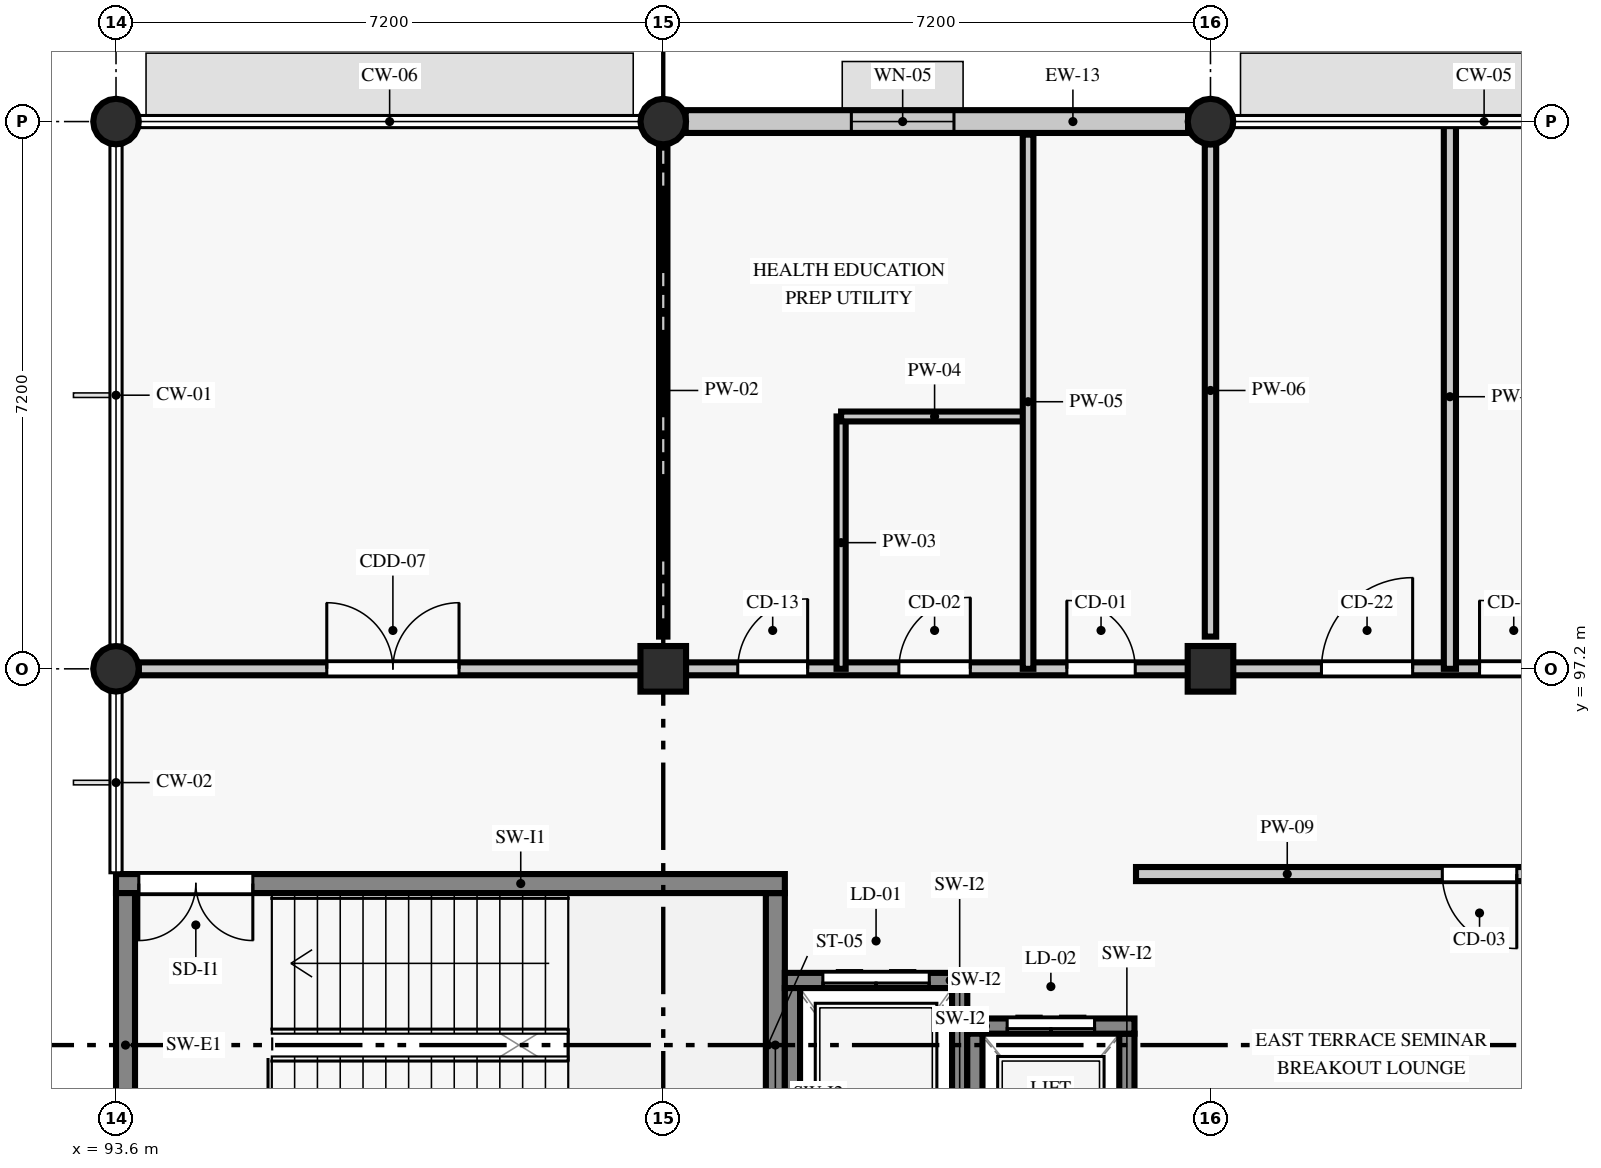
"""IFC4 building model, lengths in metres.
Left out: names, types, materials, properties, quantities, classifications, styles, units other than length and angle.
Written with IfcOpenShell. Run it as: python <this file> out.ifc"""

import sys

from ifc_helpers import new_model, si_unit, direction, frame, frame_2d, origin, origin_2d, place, context, subcontext, project, spatial, rectangle, circle, extrude, element, fill, save


model = new_model("IFC4")
c1 = context("Model", 3, precision=1e-05, world=origin(), true_north=direction((0.0, 1.0)))
c2 = subcontext(c1, "Body", "Model", "MODEL_VIEW")
j1 = project(units=[si_unit("LENGTHUNIT", "METRE"), si_unit("PLANEANGLEUNIT", "RADIAN")], contexts=[c1])
p1 = place(None, origin())
s1 = spatial("IfcSite", under=j1, at=p1, CompositionType="ELEMENT")
p2 = place(p1, origin())
s2 = spatial("IfcBuilding", under=s1, at=p2, CompositionType="ELEMENT")
p3 = place(p2, frame((0.0, 0.0, 13.8)))
s3 = spatial("IfcBuildingStorey", under=s2, at=p3, CompositionType="ELEMENT", Elevation=13.8)
for number, where, z_axis, x_axis in (
    (1, (93.6, 97.2, 0.0), (0.0, 0.0, 1.0), (1.0, 0.0, 0.0)),
    (2, (93.6, 104.4, 0.0), (0.0, 0.0, 1.0), (1.0, 0.0, 0.0)),
):
    element("IfcColumn", number, at=place(p3, frame(where, z_axis=z_axis, x_axis=x_axis)), inside=s3, PredefinedType="COLUMN", context=c2, shape_type="SweptSolid", body=[
        extrude(circle(Radius=0.3, at=origin_2d()), origin(), (0.0, 0.0, 1.0), 3.92),
    ])
p4 = place(p3, frame((100.8, 97.2, 0.0), z_axis=(0.0, 0.0, 1.0), x_axis=(1.0, 0.0, 0.0)))
e3 = element("IfcColumn", 3, at=p4, inside=s3, PredefinedType="COLUMN", context=c2, shape_type="SweptSolid", body=[
    extrude(rectangle(XDim=0.6, YDim=0.6, at=origin_2d()), origin(), (0.0, 0.0, 1.0), 3.92),
])
p5 = place(p3, frame((100.8, 104.4, 0.0), z_axis=(0.0, 0.0, 1.0), x_axis=(1.0, 0.0, 0.0)))
e4 = element("IfcColumn", 4, at=p5, inside=s3, PredefinedType="COLUMN", context=c2, shape_type="SweptSolid", body=[
    extrude(circle(Radius=0.3, at=origin_2d()), origin(), (0.0, 0.0, 1.0), 3.92),
])
p6 = place(p3, frame((108.0, 97.2, 0.0), z_axis=(0.0, 0.0, 1.0), x_axis=(1.0, 0.0, 0.0)))
e5 = element("IfcColumn", 5, at=p6, inside=s3, PredefinedType="COLUMN", context=c2, shape_type="SweptSolid", body=[
    extrude(rectangle(XDim=0.6, YDim=0.6, at=origin_2d()), origin(), (0.0, 0.0, 1.0), 3.92),
])
p7 = place(p3, frame((108.0, 104.4, 0.0), z_axis=(0.0, 0.0, 1.0), x_axis=(1.0, 0.0, 0.0)))
e6 = element("IfcColumn", 6, at=p7, inside=s3, PredefinedType="COLUMN", context=c2, shape_type="SweptSolid", body=[
    extrude(circle(Radius=0.3, at=origin_2d()), origin(), (0.0, 0.0, 1.0), 3.92),
])
p8 = place(p3, frame((107.705, 104.4, 0.0), z_axis=(0.0, 0.0, 1.0), x_axis=(-1.0, 0.0, 0.0)))
e7 = element("IfcWall", 7, at=p8, inside=s3, PredefinedType="STANDARD", context=c2, shape_type="SweptSolid", body=[
    extrude(rectangle(XDim=6.61, YDim=0.3, at=frame_2d((3.305, 0.0))), origin(), (0.0, 0.0, 1.0), 3.27),
])
p9 = place(p8, frame((3.08, 0.0, 0.9)))
e8 = element("IfcOpeningElement", 8, at=p9, cuts=e7, PredefinedType="OPENING", context=c2, shape_type="SweptSolid", body=[
    extrude(rectangle(XDim=1.35, YDim=1.3, at=frame_2d((0.675, 0.65))), frame((0.0, 0.16, 0.0), z_axis=(0.0, -1.0, 0.0), x_axis=(1.0, 0.0, 0.0)), (0.0, 0.0, 1.0), 0.32),
])
p10 = place(p3, frame((102.275, 90.25, 0.0), z_axis=(0.0, 0.0, 1.0), x_axis=(0.0, 1.0, 0.0)))
e9 = element("IfcWall", 9, at=p10, inside=s3, PredefinedType="SHEAR", context=c2, shape_type="SweptSolid", body=[
    extrude(rectangle(XDim=4.0, YDim=0.25, at=frame_2d((2.0, 0.0))), origin(), (0.0, 0.0, 1.0), 3.92),
])
p11 = place(p3, frame((102.4, 94.375, 0.0), z_axis=(0.0, 0.0, 1.0), x_axis=(-1.0, 0.0, 0.0)))
e10 = element("IfcWall", 10, at=p11, inside=s3, PredefinedType="SHEAR", context=c2, shape_type="SweptSolid", body=[
    extrude(rectangle(XDim=8.8, YDim=0.25, at=frame_2d((4.4, 0.0))), origin(), (0.0, 0.0, 1.0), 3.92),
])
p12 = place(p11, frame((7.0, 0.0, 0.0)))
e11 = element("IfcOpeningElement", 11, at=p12, cuts=e10, PredefinedType="OPENING", context=c2, shape_type="SweptSolid", body=[
    extrude(rectangle(XDim=1.5, YDim=2.15, at=frame_2d((0.75, 1.075))), frame((0.0, 0.135, 0.0), z_axis=(0.0, -1.0, 0.0), x_axis=(1.0, 0.0, 0.0)), (0.0, 0.0, 1.0), 0.27),
])
p13 = place(p3, frame((93.725, 94.25, 0.0), z_axis=(0.0, 0.0, 1.0), x_axis=(0.0, -1.0, 0.0)))
e12 = element("IfcWall", 12, at=p13, inside=s3, PredefinedType="SHEAR", context=c2, shape_type="SweptSolid", body=[
    extrude(rectangle(XDim=4.0, YDim=0.25, at=frame_2d((2.0, 0.0))), origin(), (0.0, 0.0, 1.0), 3.92),
])
p14 = place(p3, frame((104.7, 90.2, 0.0), z_axis=(0.0, 0.0, 1.0), x_axis=(0.0, 1.0, 0.0)))
e13 = element("IfcWall", 13, at=p14, inside=s3, PredefinedType="SHEAR", context=c2, shape_type="SweptSolid", body=[
    extrude(rectangle(XDim=2.8, YDim=0.2, at=frame_2d((1.4, 0.0))), origin(), (0.0, 0.0, 1.0), 3.92),
])
p15 = place(p3, frame((104.8, 93.1, 0.0), z_axis=(0.0, 0.0, 1.0), x_axis=(-1.0, 0.0, 0.0)))
e14 = element("IfcWall", 14, at=p15, inside=s3, PredefinedType="SHEAR", context=c2, shape_type="SweptSolid", body=[
    extrude(rectangle(XDim=2.4, YDim=0.2, at=frame_2d((1.2, 0.0))), origin(), (0.0, 0.0, 1.0), 3.92),
])
p16 = place(p15, frame((0.5, 0.0, 0.0)))
e15 = element("IfcOpeningElement", 15, at=p16, cuts=e14, PredefinedType="OPENING", context=c2, shape_type="SweptSolid", body=[
    extrude(rectangle(XDim=1.4, YDim=2.15, at=frame_2d((0.7, 1.075))), frame((0.0, 0.11, 0.0), z_axis=(0.0, -1.0, 0.0), x_axis=(1.0, 0.0, 0.0)), (0.0, 0.0, 1.0), 0.22),
])
p17 = place(p3, frame((102.5, 93.0, 0.0), z_axis=(0.0, 0.0, 1.0), x_axis=(0.0, -1.0, 0.0)))
e16 = element("IfcWall", 16, at=p17, inside=s3, PredefinedType="SHEAR", context=c2, shape_type="SweptSolid", body=[
    extrude(rectangle(XDim=2.8, YDim=0.2, at=frame_2d((1.4, 0.0))), origin(), (0.0, 0.0, 1.0), 3.92),
])
p18 = place(p3, frame((106.9, 90.2, 0.0), z_axis=(0.0, 0.0, 1.0), x_axis=(0.0, 1.0, 0.0)))
e17 = element("IfcWall", 17, at=p18, inside=s3, PredefinedType="SHEAR", context=c2, shape_type="SweptSolid", body=[
    extrude(rectangle(XDim=2.2, YDim=0.2, at=frame_2d((1.1, 0.0))), origin(), (0.0, 0.0, 1.0), 3.92),
])
p19 = place(p3, frame((107.0, 92.5, 0.0), z_axis=(0.0, 0.0, 1.0), x_axis=(-1.0, 0.0, 0.0)))
e18 = element("IfcWall", 18, at=p19, inside=s3, PredefinedType="SHEAR", context=c2, shape_type="SweptSolid", body=[
    extrude(rectangle(XDim=2.2, YDim=0.2, at=frame_2d((1.1, 0.0))), origin(), (0.0, 0.0, 1.0), 3.92),
])
p20 = place(p19, frame((0.525, 0.0, 0.0)))
e19 = element("IfcOpeningElement", 19, at=p20, cuts=e18, PredefinedType="OPENING", context=c2, shape_type="SweptSolid", body=[
    extrude(rectangle(XDim=1.15, YDim=2.15, at=frame_2d((0.575, 1.075))), frame((0.0, 0.11, 0.0), z_axis=(0.0, -1.0, 0.0), x_axis=(1.0, 0.0, 0.0)), (0.0, 0.0, 1.0), 0.22),
])
p21 = place(p3, frame((104.9, 92.4, 0.0), z_axis=(0.0, 0.0, 1.0), x_axis=(0.0, -1.0, 0.0)))
e20 = element("IfcWall", 20, at=p21, inside=s3, PredefinedType="SHEAR", context=c2, shape_type="SweptSolid", body=[
    extrude(rectangle(XDim=2.2, YDim=0.2, at=frame_2d((1.1, 0.0))), origin(), (0.0, 0.0, 1.0), 3.92),
])
p22 = place(p3, frame((93.9, 97.2, 0.0), z_axis=(0.0, 0.0, 1.0), x_axis=(1.0, 0.0, 0.0)))
e21 = element("IfcWall", 21, at=p22, inside=s3, PredefinedType="PARTITIONING", context=c2, shape_type="SweptSolid", body=[
    extrude(rectangle(XDim=28.2, YDim=0.17, at=frame_2d((14.1, 0.0))), origin(), (0.0, 0.0, 1.0), 3.17),
])
p23 = place(p22, frame((2.473, 0.0, 0.0)))
e22 = element("IfcOpeningElement", 22, at=p23, cuts=e21, PredefinedType="OPENING", context=c2, shape_type="SweptSolid", body=[
    extrude(rectangle(XDim=1.74, YDim=2.26, at=frame_2d((0.87, 1.13))), frame((0.0, 0.095, 0.0), z_axis=(0.0, -1.0, 0.0), x_axis=(1.0, 0.0, 0.0)), (0.0, 0.0, 1.0), 0.19),
])
p24 = place(p22, frame((7.88, 0.0, 0.0)))
e23 = element("IfcOpeningElement", 23, at=p24, cuts=e21, PredefinedType="OPENING", context=c2, shape_type="SweptSolid", body=[
    extrude(rectangle(XDim=0.92, YDim=2.18, at=frame_2d((0.46, 1.09))), frame((0.0, 0.095, 0.0), z_axis=(0.0, -1.0, 0.0), x_axis=(1.0, 0.0, 0.0)), (0.0, 0.0, 1.0), 0.19),
])
p25 = place(p22, frame((10.0, 0.0, 0.0)))
e24 = element("IfcOpeningElement", 24, at=p25, cuts=e21, PredefinedType="OPENING", context=c2, shape_type="SweptSolid", body=[
    extrude(rectangle(XDim=0.94, YDim=2.08, at=frame_2d((0.47, 1.04))), frame((0.0, 0.095, 0.0), z_axis=(0.0, -1.0, 0.0), x_axis=(1.0, 0.0, 0.0)), (0.0, 0.0, 1.0), 0.19),
])
p26 = place(p22, frame((12.21, 0.0, 0.0)))
e25 = element("IfcOpeningElement", 25, at=p26, cuts=e21, PredefinedType="OPENING", context=c2, shape_type="SweptSolid", body=[
    extrude(rectangle(XDim=0.9, YDim=2.08, at=frame_2d((0.45, 1.04))), frame((0.0, 0.095, 0.0), z_axis=(0.0, -1.0, 0.0), x_axis=(1.0, 0.0, 0.0)), (0.0, 0.0, 1.0), 0.19),
])
p27 = place(p22, frame((15.56, 0.0, 0.0)))
e26 = element("IfcOpeningElement", 26, at=p27, cuts=e21, PredefinedType="OPENING", context=c2, shape_type="SweptSolid", body=[
    extrude(rectangle(XDim=1.2, YDim=2.23, at=frame_2d((0.6, 1.115))), frame((0.0, 0.095, 0.0), z_axis=(0.0, -1.0, 0.0), x_axis=(1.0, 0.0, 0.0)), (0.0, 0.0, 1.0), 0.19),
])
p28 = place(p22, frame((17.64, 0.0, 0.0)))
e27 = element("IfcOpeningElement", 27, at=p28, cuts=e21, PredefinedType="OPENING", context=c2, shape_type="SweptSolid", body=[
    extrude(rectangle(XDim=0.9, YDim=2.08, at=frame_2d((0.45, 1.04))), frame((0.0, 0.095, 0.0), z_axis=(0.0, -1.0, 0.0), x_axis=(1.0, 0.0, 0.0)), (0.0, 0.0, 1.0), 0.19),
])
p29 = place(p22, frame((24.254, 0.0, 0.0)))
e28 = element("IfcOpeningElement", 28, at=p29, cuts=e21, PredefinedType="OPENING", context=c2, shape_type="SweptSolid", body=[
    extrude(rectangle(XDim=0.94, YDim=2.08, at=frame_2d((0.47, 1.04))), frame((0.0, 0.095, 0.0), z_axis=(0.0, -1.0, 0.0), x_axis=(1.0, 0.0, 0.0)), (0.0, 0.0, 1.0), 0.19),
])
p30 = place(p3, frame((100.8, 97.624, 0.0), z_axis=(0.0, 0.0, 1.0), x_axis=(0.0, 1.0, 0.0)))
e29 = element("IfcWall", 29, at=p30, inside=s3, PredefinedType="PARTITIONING", context=c2, shape_type="SweptSolid", body=[
    extrude(rectangle(XDim=6.476, YDim=0.11, at=frame_2d((3.238, 0.0))), origin(), (0.0, 0.0, 1.0), 3.37),
])
p31 = place(p3, frame((103.14, 97.2, 0.0), z_axis=(0.0, 0.0, 1.0), x_axis=(0.0, 1.0, 0.0)))
e30 = element("IfcWall", 30, at=p31, inside=s3, PredefinedType="PARTITIONING", context=c2, shape_type="SweptSolid", body=[
    extrude(rectangle(XDim=3.32, YDim=0.12, at=frame_2d((1.66, 0.0))), origin(), (0.0, 0.0, 1.0), 3.17),
])
p32 = place(p3, frame((103.14, 100.52, 0.0), z_axis=(0.0, 0.0, 1.0), x_axis=(1.0, 0.0, 0.0)))
e31 = element("IfcWall", 31, at=p32, inside=s3, PredefinedType="PARTITIONING", context=c2, shape_type="SweptSolid", body=[
    extrude(rectangle(XDim=2.46, YDim=0.13, at=frame_2d((1.23, 0.0))), origin(), (0.0, 0.0, 1.0), 3.92),
])
p33 = place(p3, frame((105.6, 97.2, 0.0), z_axis=(0.0, 0.0, 1.0), x_axis=(0.0, 1.0, 0.0)))
e32 = element("IfcWall", 32, at=p33, inside=s3, PredefinedType="PARTITIONING", context=c2, shape_type="SweptSolid", body=[
    extrude(rectangle(XDim=7.028, YDim=0.14, at=frame_2d((3.514, 0.0))), origin(), (0.0, 0.0, 1.0), 3.17),
])
p34 = place(p3, frame((108.0, 97.624, 0.0), z_axis=(0.0, 0.0, 1.0), x_axis=(0.0, 1.0, 0.0)))
e33 = element("IfcWall", 33, at=p34, inside=s3, PredefinedType="PARTITIONING", context=c2, shape_type="SweptSolid", body=[
    extrude(rectangle(XDim=6.476, YDim=0.15, at=frame_2d((3.238, 0.0))), origin(), (0.0, 0.0, 1.0), 3.37),
])
p35 = place(p3, frame((111.15, 97.2, 0.0), z_axis=(0.0, 0.0, 1.0), x_axis=(0.0, 1.0, 0.0)))
e34 = element("IfcWall", 34, at=p35, inside=s3, PredefinedType="PARTITIONING", context=c2, shape_type="SweptSolid", body=[
    extrude(rectangle(XDim=7.16, YDim=0.16, at=frame_2d((3.58, 0.0))), origin(), (0.0, 0.0, 1.0), 3.17),
])
p36 = place(p3, frame((107.02, 94.5, 0.0), z_axis=(0.0, 0.0, 1.0), x_axis=(1.0, 0.0, 0.0)))
e35 = element("IfcWall", 35, at=p36, inside=s3, PredefinedType="PARTITIONING", context=c2, shape_type="SweptSolid", body=[
    extrude(rectangle(XDim=6.56, YDim=0.185, at=frame_2d((3.28, 0.0))), origin(), (0.0, 0.0, 1.0), 3.37),
])
p37 = place(p36, frame((4.03, 0.0, 0.0)))
e36 = element("IfcOpeningElement", 36, at=p37, cuts=e35, PredefinedType="OPENING", context=c2, shape_type="SweptSolid", body=[
    extrude(rectangle(XDim=0.98, YDim=2.08, at=frame_2d((0.49, 1.04))), frame((0.0, 0.103, 0.0), z_axis=(0.0, -1.0, 0.0), x_axis=(1.0, 0.0, 0.0)), (0.0, 0.0, 1.0), 0.205),
])
p38 = place(p9, origin())
e37 = element("IfcWindow", 37, at=p38, inside=s3, PartitioningType="SINGLE_PANEL", PredefinedType="WINDOW", context=c2, shape_type="SweptSolid", body=[
    extrude(rectangle(XDim=1.35, YDim=1.3, at=frame_2d((0.675, 0.65))), frame((0.0, 0.03, 0.0), z_axis=(0.0, -1.0, 0.0), x_axis=(1.0, 0.0, 0.0)), (0.0, 0.0, 1.0), 0.06),
])
fill(e8, e37)
p39 = place(p12, origin())
e38 = element("IfcDoor", 38, at=p39, inside=s3, OperationType="DOUBLE_DOOR_SINGLE_SWING", PredefinedType="DOOR", context=c2, shape_type="SweptSolid", body=[
    extrude(rectangle(XDim=1.5, YDim=2.15, at=frame_2d((0.75, 1.075))), frame((0.0, 0.025, 0.0), z_axis=(0.0, -1.0, 0.0), x_axis=(1.0, 0.0, 0.0)), (0.0, 0.0, 1.0), 0.05),
])
fill(e11, e38)
p40 = place(p16, frame((1.4, 0.0, 0.0), z_axis=(0.0, 0.0, 1.0), x_axis=(-1.0, 0.0, 0.0)))
e39 = element("IfcDoor", 39, at=p40, inside=s3, OperationType="DOUBLE_DOOR_SLIDING", PredefinedType="DOOR", context=c2, shape_type="SweptSolid", body=[
    extrude(rectangle(XDim=1.4, YDim=2.15, at=frame_2d((0.7, 1.075))), frame((0.0, 0.025, 0.0), z_axis=(0.0, -1.0, 0.0), x_axis=(1.0, 0.0, 0.0)), (0.0, 0.0, 1.0), 0.05),
])
fill(e15, e39)
p41 = place(p20, frame((1.15, 0.0, 0.0), z_axis=(0.0, 0.0, 1.0), x_axis=(-1.0, 0.0, 0.0)))
e40 = element("IfcDoor", 40, at=p41, inside=s3, OperationType="DOUBLE_DOOR_SLIDING", PredefinedType="DOOR", context=c2, shape_type="SweptSolid", body=[
    extrude(rectangle(XDim=1.15, YDim=2.15, at=frame_2d((0.575, 1.075))), frame((0.0, 0.025, 0.0), z_axis=(0.0, -1.0, 0.0), x_axis=(1.0, 0.0, 0.0)), (0.0, 0.0, 1.0), 0.05),
])
fill(e19, e40)
p42 = place(p23, origin())
e41 = element("IfcDoor", 41, at=p42, inside=s3, OperationType="DOUBLE_DOOR_SINGLE_SWING", PredefinedType="DOOR", context=c2, shape_type="SweptSolid", body=[
    extrude(rectangle(XDim=1.74, YDim=2.26, at=frame_2d((0.87, 1.13))), frame((0.0, 0.025, 0.0), z_axis=(0.0, -1.0, 0.0), x_axis=(1.0, 0.0, 0.0)), (0.0, 0.0, 1.0), 0.05),
])
fill(e22, e41)
p43 = place(p24, origin())
e42 = element("IfcDoor", 42, at=p43, inside=s3, OperationType="SINGLE_SWING_RIGHT", PredefinedType="DOOR", context=c2, shape_type="SweptSolid", body=[
    extrude(rectangle(XDim=0.92, YDim=2.18, at=frame_2d((0.46, 1.09))), frame((0.0, 0.025, 0.0), z_axis=(0.0, -1.0, 0.0), x_axis=(1.0, 0.0, 0.0)), (0.0, 0.0, 1.0), 0.05),
])
fill(e23, e42)
p44 = place(p25, origin())
e43 = element("IfcDoor", 43, at=p44, inside=s3, OperationType="SINGLE_SWING_RIGHT", PredefinedType="DOOR", context=c2, shape_type="SweptSolid", body=[
    extrude(rectangle(XDim=0.94, YDim=2.08, at=frame_2d((0.47, 1.04))), frame((0.0, 0.025, 0.0), z_axis=(0.0, -1.0, 0.0), x_axis=(1.0, 0.0, 0.0)), (0.0, 0.0, 1.0), 0.05),
])
fill(e24, e43)
p45 = place(p26, origin())
e44 = element("IfcDoor", 44, at=p45, inside=s3, OperationType="SINGLE_SWING_LEFT", PredefinedType="DOOR", context=c2, shape_type="SweptSolid", body=[
    extrude(rectangle(XDim=0.9, YDim=2.08, at=frame_2d((0.45, 1.04))), frame((0.0, 0.025, 0.0), z_axis=(0.0, -1.0, 0.0), x_axis=(1.0, 0.0, 0.0)), (0.0, 0.0, 1.0), 0.05),
])
fill(e25, e44)
p46 = place(p27, origin())
e45 = element("IfcDoor", 45, at=p46, inside=s3, OperationType="SINGLE_SWING_RIGHT", PredefinedType="DOOR", context=c2, shape_type="SweptSolid", body=[
    extrude(rectangle(XDim=1.2, YDim=2.23, at=frame_2d((0.6, 1.115))), frame((0.0, 0.025, 0.0), z_axis=(0.0, -1.0, 0.0), x_axis=(1.0, 0.0, 0.0)), (0.0, 0.0, 1.0), 0.05),
])
fill(e26, e45)
p47 = place(p28, origin())
e46 = element("IfcDoor", 46, at=p47, inside=s3, OperationType="SINGLE_SWING_LEFT", PredefinedType="DOOR", context=c2, shape_type="SweptSolid", body=[
    extrude(rectangle(XDim=0.9, YDim=2.08, at=frame_2d((0.45, 1.04))), frame((0.0, 0.025, 0.0), z_axis=(0.0, -1.0, 0.0), x_axis=(1.0, 0.0, 0.0)), (0.0, 0.0, 1.0), 0.05),
])
fill(e27, e46)
p48 = place(p37, frame((0.98, 0.0, 0.0), z_axis=(0.0, 0.0, 1.0), x_axis=(-1.0, 0.0, 0.0)))
e47 = element("IfcDoor", 47, at=p48, inside=s3, OperationType="SINGLE_SWING_LEFT", PredefinedType="DOOR", context=c2, shape_type="SweptSolid", body=[
    extrude(rectangle(XDim=0.98, YDim=2.08, at=frame_2d((0.49, 1.04))), frame((0.0, 0.025, 0.0), z_axis=(0.0, -1.0, 0.0), x_axis=(1.0, 0.0, 0.0)), (0.0, 0.0, 1.0), 0.05),
])
fill(e36, e47)
save(model, sys.argv[1])
